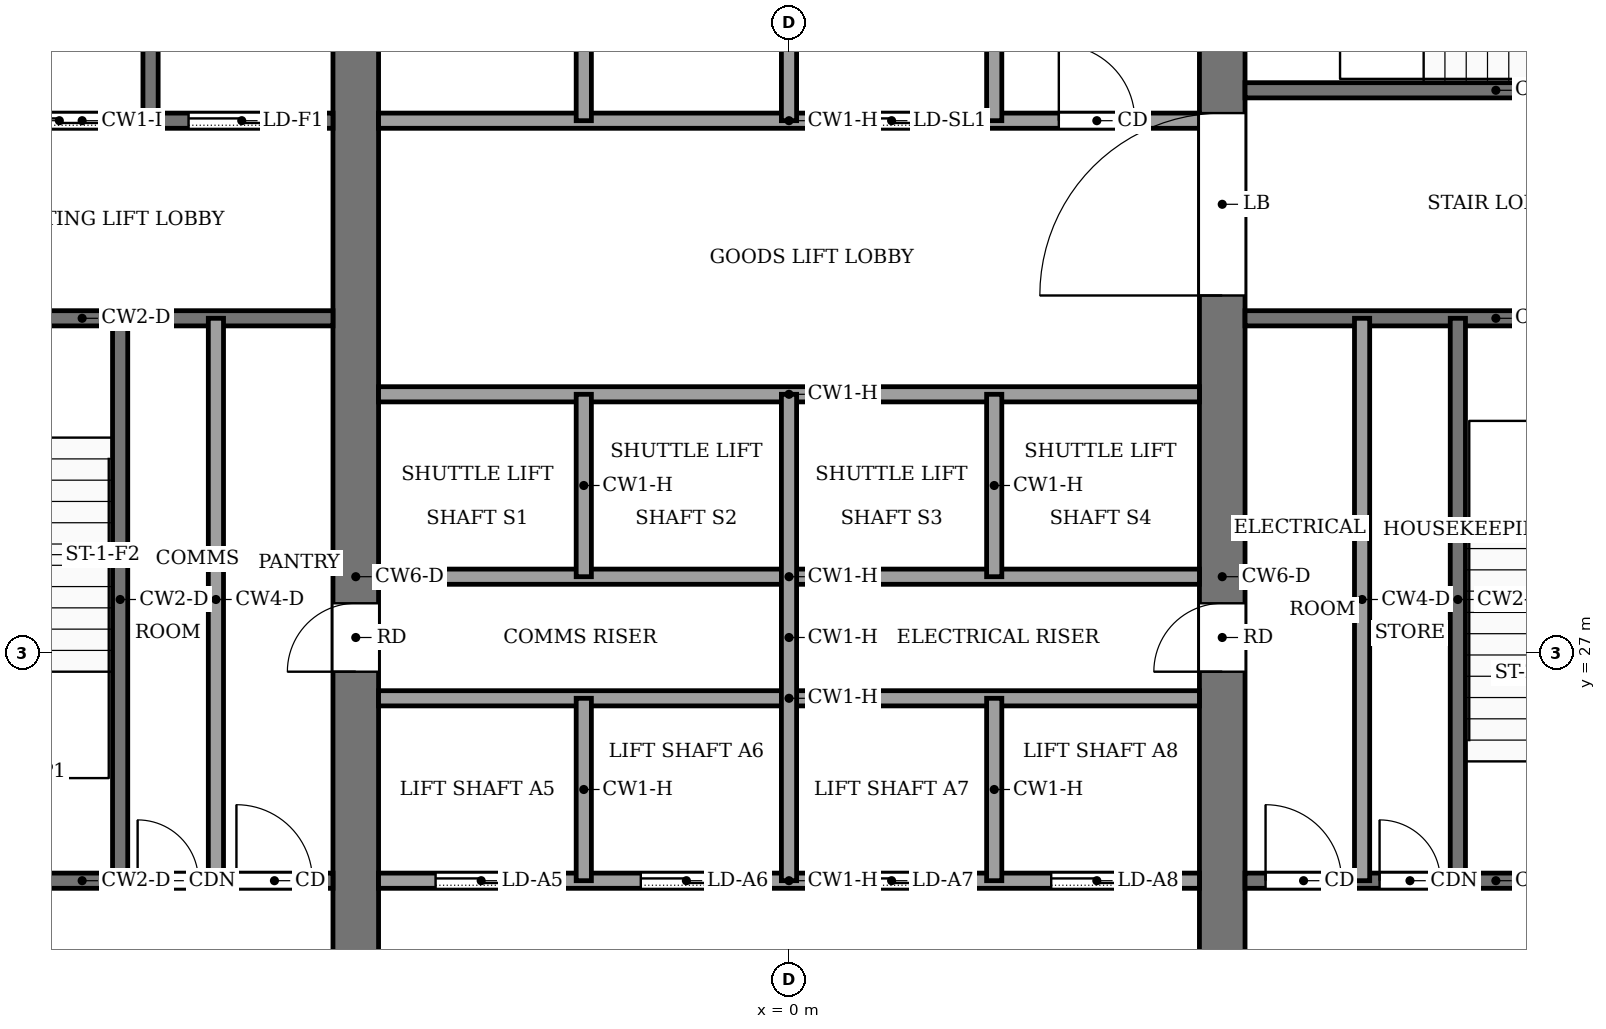
"""IFC4 building model, lengths in metres.
Left out: names, types, materials, properties, quantities, classifications, styles, units other than length and angle.
Written with IfcOpenShell. Run it as: python <this file> out.ifc"""

import sys

from ifc_helpers import new_model, si_unit, direction, frame, frame_2d, origin, place, context, subcontext, project, spatial, rectangle, extrude, element, fill, save


model = new_model("IFC4")
c1 = context("Model", 3, precision=1e-05, world=origin(), true_north=direction((0.0, 1.0)))
c2 = subcontext(c1, "Body", "Model", "MODEL_VIEW")
j1 = project(units=[si_unit("LENGTHUNIT", "METRE"), si_unit("PLANEANGLEUNIT", "RADIAN")], contexts=[c1])
p1 = place(None, origin())
s1 = spatial("IfcSite", under=j1, at=p1, CompositionType="ELEMENT")
p2 = place(p1, origin())
s2 = spatial("IfcBuilding", under=s1, at=p2, CompositionType="ELEMENT")
p3 = place(p2, frame((0.0, 0.0, 54.0)))
s3 = spatial("IfcBuildingStorey", under=s2, at=p3, CompositionType="ELEMENT", Elevation=54.0)
p4 = place(p3, frame((-5.7, 18.4, -0.13), z_axis=(0.0, 0.0, 1.0), x_axis=(0.0, 1.0, 0.0)))
e1 = element("IfcWall", 1, at=p4, inside=s3, PredefinedType="SHEAR", context=c2, shape_type="SweptSolid", body=[
    extrude(rectangle(XDim=19.2, YDim=0.6, at=frame_2d((9.6, 0.0))), origin(), (0.0, 0.0, 1.0), 3.88),
])
p5 = place(p4, frame((8.35, 0.0, 0.13)))
e2 = element("IfcOpeningElement", 2, at=p5, cuts=e1, PredefinedType="OPENING", context=c2, shape_type="SweptSolid", body=[
    extrude(rectangle(XDim=0.9, YDim=2.1, at=frame_2d((0.45, 1.05))), frame((0.0, 0.31, 0.0), z_axis=(0.0, -1.0, 0.0), x_axis=(1.0, 0.0, 0.0)), (0.0, 0.0, 1.0), 0.62),
])
p6 = place(p3, frame((5.7, 18.4, -0.13), z_axis=(0.0, 0.0, 1.0), x_axis=(0.0, 1.0, 0.0)))
e3 = element("IfcWall", 3, at=p6, inside=s3, PredefinedType="SHEAR", context=c2, shape_type="SweptSolid", body=[
    extrude(rectangle(XDim=19.2, YDim=0.6, at=frame_2d((9.6, 0.0))), origin(), (0.0, 0.0, 1.0), 3.88),
])
p7 = place(p6, frame((8.35, 0.0, 0.13)))
e4 = element("IfcOpeningElement", 4, at=p7, cuts=e3, PredefinedType="OPENING", context=c2, shape_type="SweptSolid", body=[
    extrude(rectangle(XDim=0.9, YDim=2.1, at=frame_2d((0.45, 1.05))), frame((0.0, 0.31, 0.0), z_axis=(0.0, -1.0, 0.0), x_axis=(1.0, 0.0, 0.0)), (0.0, 0.0, 1.0), 0.62),
])
p8 = place(p6, frame((13.3, 0.0, 0.13)))
e5 = element("IfcOpeningElement", 5, at=p8, cuts=e3, PredefinedType="OPENING", context=c2, shape_type="SweptSolid", body=[
    extrude(rectangle(XDim=2.4, YDim=2.4, at=frame_2d((1.2, 1.2))), frame((0.0, 0.31, 0.0), z_axis=(0.0, -1.0, 0.0), x_axis=(1.0, 0.0, 0.0)), (0.0, 0.0, 1.0), 0.62),
])
p9 = place(p3, frame((-12.6, 24.0, 0.0), z_axis=(0.0, 0.0, 1.0), x_axis=(1.0, 0.0, 0.0)))
e6 = element("IfcWall", 6, at=p9, inside=s3, PredefinedType="PARTITIONING", context=c2, shape_type="SweptSolid", body=[
    extrude(rectangle(XDim=6.6, YDim=0.2, at=frame_2d((3.3, 0.0))), origin(), (0.0, 0.0, 1.0), 3.75),
])
p10 = place(p9, frame((4.03, 0.0, 0.0)))
e7 = element("IfcOpeningElement", 7, at=p10, cuts=e6, PredefinedType="OPENING", context=c2, shape_type="SweptSolid", body=[
    extrude(rectangle(XDim=0.8, YDim=2.1, at=frame_2d((0.4, 1.05))), frame((0.0, 0.11, 0.0), z_axis=(0.0, -1.0, 0.0), x_axis=(1.0, 0.0, 0.0)), (0.0, 0.0, 1.0), 0.22),
])
p11 = place(p9, frame((5.33, 0.0, 0.0)))
e8 = element("IfcOpeningElement", 8, at=p11, cuts=e6, PredefinedType="OPENING", context=c2, shape_type="SweptSolid", body=[
    extrude(rectangle(XDim=1.0, YDim=2.1, at=frame_2d((0.5, 1.05))), frame((0.0, 0.11, 0.0), z_axis=(0.0, -1.0, 0.0), x_axis=(1.0, 0.0, 0.0)), (0.0, 0.0, 1.0), 0.22),
])
p12 = place(p3, frame((-5.4, 24.0, 0.0), z_axis=(0.0, 0.0, 1.0), x_axis=(1.0, 0.0, 0.0)))
e9 = element("IfcWall", 9, at=p12, inside=s3, PredefinedType="PARTITIONING", context=c2, shape_type="SweptSolid", body=[
    extrude(rectangle(XDim=10.8, YDim=0.2, at=frame_2d((5.4, 0.0))), origin(), (0.0, 0.0, 1.0), 3.75),
])
p13 = place(p12, frame((0.75, 0.0, 0.0)))
e10 = element("IfcOpeningElement", 10, at=p13, cuts=e9, PredefinedType="OPENING", context=c2, shape_type="SweptSolid", body=[
    extrude(rectangle(XDim=1.2, YDim=2.2, at=frame_2d((0.6, 1.1))), frame((0.0, 0.11, 0.0), z_axis=(0.0, -1.0, 0.0), x_axis=(1.0, 0.0, 0.0)), (0.0, 0.0, 1.0), 0.22),
])
p14 = place(p12, frame((3.45, 0.0, 0.0)))
e11 = element("IfcOpeningElement", 11, at=p14, cuts=e9, PredefinedType="OPENING", context=c2, shape_type="SweptSolid", body=[
    extrude(rectangle(XDim=1.2, YDim=2.2, at=frame_2d((0.6, 1.1))), frame((0.0, 0.11, 0.0), z_axis=(0.0, -1.0, 0.0), x_axis=(1.0, 0.0, 0.0)), (0.0, 0.0, 1.0), 0.22),
])
p15 = place(p12, frame((6.15, 0.0, 0.0)))
e12 = element("IfcOpeningElement", 12, at=p15, cuts=e9, PredefinedType="OPENING", context=c2, shape_type="SweptSolid", body=[
    extrude(rectangle(XDim=1.2, YDim=2.2, at=frame_2d((0.6, 1.1))), frame((0.0, 0.11, 0.0), z_axis=(0.0, -1.0, 0.0), x_axis=(1.0, 0.0, 0.0)), (0.0, 0.0, 1.0), 0.22),
])
p16 = place(p12, frame((8.85, 0.0, 0.0)))
e13 = element("IfcOpeningElement", 13, at=p16, cuts=e9, PredefinedType="OPENING", context=c2, shape_type="SweptSolid", body=[
    extrude(rectangle(XDim=1.2, YDim=2.2, at=frame_2d((0.6, 1.1))), frame((0.0, 0.11, 0.0), z_axis=(0.0, -1.0, 0.0), x_axis=(1.0, 0.0, 0.0)), (0.0, 0.0, 1.0), 0.22),
])
p17 = place(p3, frame((6.0, 24.0, 0.0), z_axis=(0.0, 0.0, 1.0), x_axis=(1.0, 0.0, 0.0)))
e14 = element("IfcWall", 14, at=p17, inside=s3, PredefinedType="PARTITIONING", context=c2, shape_type="SweptSolid", body=[
    extrude(rectangle(XDim=6.6, YDim=0.2, at=frame_2d((3.3, 0.0))), origin(), (0.0, 0.0, 1.0), 3.75),
])
p18 = place(p17, frame((0.27, 0.0, 0.0)))
e15 = element("IfcOpeningElement", 15, at=p18, cuts=e14, PredefinedType="OPENING", context=c2, shape_type="SweptSolid", body=[
    extrude(rectangle(XDim=1.0, YDim=2.1, at=frame_2d((0.5, 1.05))), frame((0.0, 0.11, 0.0), z_axis=(0.0, -1.0, 0.0), x_axis=(1.0, 0.0, 0.0)), (0.0, 0.0, 1.0), 0.22),
])
p19 = place(p17, frame((1.77, 0.0, 0.0)))
e16 = element("IfcOpeningElement", 16, at=p19, cuts=e14, PredefinedType="OPENING", context=c2, shape_type="SweptSolid", body=[
    extrude(rectangle(XDim=0.8, YDim=2.1, at=frame_2d((0.4, 1.05))), frame((0.0, 0.11, 0.0), z_axis=(0.0, -1.0, 0.0), x_axis=(1.0, 0.0, 0.0)), (0.0, 0.0, 1.0), 0.22),
])
p20 = place(p17, frame((4.4, 0.0, 0.0)))
e17 = element("IfcOpeningElement", 17, at=p20, cuts=e14, PredefinedType="OPENING", context=c2, shape_type="SweptSolid", body=[
    extrude(rectangle(XDim=1.2, YDim=2.2, at=frame_2d((0.6, 1.1))), frame((0.0, 0.11, 0.0), z_axis=(0.0, -1.0, 0.0), x_axis=(1.0, 0.0, 0.0)), (0.0, 0.0, 1.0), 0.22),
])
for number, where, z_axis, x_axis in (
    (18, (-5.4, 26.4, 0.0), (0.0, 0.0, 1.0), (1.0, 0.0, 0.0)),
    (19, (-5.4, 28.0, 0.0), (0.0, 0.0, 1.0), (1.0, 0.0, 0.0)),
    (20, (-5.4, 30.4, 0.0), (0.0, 0.0, 1.0), (1.0, 0.0, 0.0)),
):
    element("IfcWall", number, at=place(p3, frame(where, z_axis=z_axis, x_axis=x_axis)), inside=s3, PredefinedType="PARTITIONING", context=c2, shape_type="SweptSolid", body=[
        extrude(rectangle(XDim=10.8, YDim=0.2, at=frame_2d((5.4, 0.0))), origin(), (0.0, 0.0, 1.0), 3.75),
    ])
p21 = place(p3, frame((-12.6, 31.4, 0.0), z_axis=(0.0, 0.0, 1.0), x_axis=(1.0, 0.0, 0.0)))
e21 = element("IfcWall", 21, at=p21, inside=s3, PredefinedType="PARTITIONING", context=c2, shape_type="SweptSolid", body=[
    extrude(rectangle(XDim=6.6, YDim=0.2, at=frame_2d((3.3, 0.0))), origin(), (0.0, 0.0, 1.0), 3.75),
])
p22 = place(p21, frame((1.0, 0.0, 0.0)))
e22 = element("IfcOpeningElement", 22, at=p22, cuts=e21, PredefinedType="OPENING", context=c2, shape_type="SweptSolid", body=[
    extrude(rectangle(XDim=1.2, YDim=2.2, at=frame_2d((0.6, 1.1))), frame((0.0, 0.11, 0.0), z_axis=(0.0, -1.0, 0.0), x_axis=(1.0, 0.0, 0.0)), (0.0, 0.0, 1.0), 0.22),
])
p23 = place(p3, frame((6.0, 31.4, 0.0), z_axis=(0.0, 0.0, 1.0), x_axis=(1.0, 0.0, 0.0)))
e23 = element("IfcWall", 23, at=p23, inside=s3, PredefinedType="PARTITIONING", context=c2, shape_type="SweptSolid", body=[
    extrude(rectangle(XDim=6.6, YDim=0.2, at=frame_2d((3.3, 0.0))), origin(), (0.0, 0.0, 1.0), 3.75),
])
p24 = place(p3, frame((-12.6, 34.0, 0.0), z_axis=(0.0, 0.0, 1.0), x_axis=(1.0, 0.0, 0.0)))
e24 = element("IfcWall", 24, at=p24, inside=s3, PredefinedType="PARTITIONING", context=c2, shape_type="SweptSolid", body=[
    extrude(rectangle(XDim=6.6, YDim=0.2, at=frame_2d((3.3, 0.0))), origin(), (0.0, 0.0, 1.0), 3.75),
])
p25 = place(p24, frame((4.7, 0.0, 0.0)))
e25 = element("IfcOpeningElement", 25, at=p25, cuts=e24, PredefinedType="OPENING", context=c2, shape_type="SweptSolid", body=[
    extrude(rectangle(XDim=1.4, YDim=2.2, at=frame_2d((0.7, 1.1))), frame((0.0, 0.11, 0.0), z_axis=(0.0, -1.0, 0.0), x_axis=(1.0, 0.0, 0.0)), (0.0, 0.0, 1.0), 0.22),
])
p26 = place(p24, frame((2.3, 0.0, 0.0)))
e26 = element("IfcOpeningElement", 26, at=p26, cuts=e24, PredefinedType="OPENING", context=c2, shape_type="SweptSolid", body=[
    extrude(rectangle(XDim=1.4, YDim=2.2, at=frame_2d((0.7, 1.1))), frame((0.0, 0.11, 0.0), z_axis=(0.0, -1.0, 0.0), x_axis=(1.0, 0.0, 0.0)), (0.0, 0.0, 1.0), 0.22),
])
p27 = place(p24, frame((0.45, 0.0, 0.0)))
e27 = element("IfcOpeningElement", 27, at=p27, cuts=e24, PredefinedType="OPENING", context=c2, shape_type="SweptSolid", body=[
    extrude(rectangle(XDim=0.9, YDim=2.1, at=frame_2d((0.45, 1.05))), frame((0.0, 0.11, 0.0), z_axis=(0.0, -1.0, 0.0), x_axis=(1.0, 0.0, 0.0)), (0.0, 0.0, 1.0), 0.22),
])
p28 = place(p3, frame((-5.4, 34.0, 0.0), z_axis=(0.0, 0.0, 1.0), x_axis=(1.0, 0.0, 0.0)))
e28 = element("IfcWall", 28, at=p28, inside=s3, PredefinedType="PARTITIONING", context=c2, shape_type="SweptSolid", body=[
    extrude(rectangle(XDim=10.8, YDim=0.2, at=frame_2d((5.4, 0.0))), origin(), (0.0, 0.0, 1.0), 3.75),
])
p29 = place(p28, frame((6.15, 0.0, 0.0)))
e29 = element("IfcOpeningElement", 29, at=p29, cuts=e28, PredefinedType="OPENING", context=c2, shape_type="SweptSolid", body=[
    extrude(rectangle(XDim=1.2, YDim=2.2, at=frame_2d((0.6, 1.1))), frame((0.0, 0.11, 0.0), z_axis=(0.0, -1.0, 0.0), x_axis=(1.0, 0.0, 0.0)), (0.0, 0.0, 1.0), 0.22),
])
p30 = place(p28, frame((8.95, 0.0, 0.0)))
e30 = element("IfcOpeningElement", 30, at=p30, cuts=e28, PredefinedType="OPENING", context=c2, shape_type="SweptSolid", body=[
    extrude(rectangle(XDim=1.0, YDim=2.1, at=frame_2d((0.5, 1.05))), frame((0.0, 0.11, 0.0), z_axis=(0.0, -1.0, 0.0), x_axis=(1.0, 0.0, 0.0)), (0.0, 0.0, 1.0), 0.22),
])
p31 = place(p3, frame((6.0, 34.4, 0.0), z_axis=(0.0, 0.0, 1.0), x_axis=(1.0, 0.0, 0.0)))
e31 = element("IfcWall", 31, at=p31, inside=s3, PredefinedType="PARTITIONING", context=c2, shape_type="SweptSolid", body=[
    extrude(rectangle(XDim=6.6, YDim=0.2, at=frame_2d((3.3, 0.0))), origin(), (0.0, 0.0, 1.0), 3.75),
])
p32 = place(p31, frame((4.8, 0.0, 0.0)))
e32 = element("IfcOpeningElement", 32, at=p32, cuts=e31, PredefinedType="OPENING", context=c2, shape_type="SweptSolid", body=[
    extrude(rectangle(XDim=1.2, YDim=2.2, at=frame_2d((0.6, 1.1))), frame((0.0, 0.11, 0.0), z_axis=(0.0, -1.0, 0.0), x_axis=(1.0, 0.0, 0.0)), (0.0, 0.0, 1.0), 0.22),
])
p33 = place(p3, frame((-8.8, 24.0, 0.0), z_axis=(0.0, 0.0, 1.0), x_axis=(0.0, 1.0, 0.0)))
e33 = element("IfcWall", 33, at=p33, inside=s3, PredefinedType="PARTITIONING", context=c2, shape_type="SweptSolid", body=[
    extrude(rectangle(XDim=7.4, YDim=0.2, at=frame_2d((3.7, 0.0))), origin(), (0.0, 0.0, 1.0), 3.75),
])
p34 = place(p3, frame((-8.4, 34.0, 0.0), z_axis=(0.0, 0.0, 1.0), x_axis=(0.0, 1.0, 0.0)))
e34 = element("IfcWall", 34, at=p34, inside=s3, PredefinedType="PARTITIONING", context=c2, shape_type="SweptSolid", body=[
    extrude(rectangle(XDim=3.6, YDim=0.2, at=frame_2d((1.8, 0.0))), origin(), (0.0, 0.0, 1.0), 3.75),
])
p35 = place(p3, frame((-7.54, 24.0, 0.0), z_axis=(0.0, 0.0, 1.0), x_axis=(0.0, 1.0, 0.0)))
e35 = element("IfcWall", 35, at=p35, inside=s3, PredefinedType="PARTITIONING", context=c2, shape_type="SweptSolid", body=[
    extrude(rectangle(XDim=7.4, YDim=0.2, at=frame_2d((3.7, 0.0))), origin(), (0.0, 0.0, 1.0), 3.75),
])
for number, where, z_axis, x_axis in (
    (36, (-2.7, 24.0, 0.0), (0.0, 0.0, 1.0), (0.0, 1.0, 0.0)),
    (37, (-2.7, 28.0, 0.0), (0.0, 0.0, 1.0), (0.0, 1.0, 0.0)),
):
    element("IfcWall", number, at=place(p3, frame(where, z_axis=z_axis, x_axis=x_axis)), inside=s3, PredefinedType="PARTITIONING", context=c2, shape_type="SweptSolid", body=[
        extrude(rectangle(XDim=2.4, YDim=0.2, at=frame_2d((1.2, 0.0))), origin(), (0.0, 0.0, 1.0), 3.75),
    ])
p36 = place(p3, frame((-2.7, 34.0, 0.0), z_axis=(0.0, 0.0, 1.0), x_axis=(0.0, 1.0, 0.0)))
e38 = element("IfcWall", 38, at=p36, inside=s3, PredefinedType="PARTITIONING", context=c2, shape_type="SweptSolid", body=[
    extrude(rectangle(XDim=3.6, YDim=0.2, at=frame_2d((1.8, 0.0))), origin(), (0.0, 0.0, 1.0), 3.75),
])
p37 = place(p3, frame((0.0, 24.0, 0.0), z_axis=(0.0, 0.0, 1.0), x_axis=(0.0, 1.0, 0.0)))
e39 = element("IfcWall", 39, at=p37, inside=s3, PredefinedType="PARTITIONING", context=c2, shape_type="SweptSolid", body=[
    extrude(rectangle(XDim=6.4, YDim=0.2, at=frame_2d((3.2, 0.0))), origin(), (0.0, 0.0, 1.0), 3.75),
])
p38 = place(p3, frame((0.0, 34.0, 0.0), z_axis=(0.0, 0.0, 1.0), x_axis=(0.0, 1.0, 0.0)))
e40 = element("IfcWall", 40, at=p38, inside=s3, PredefinedType="PARTITIONING", context=c2, shape_type="SweptSolid", body=[
    extrude(rectangle(XDim=3.6, YDim=0.2, at=frame_2d((1.8, 0.0))), origin(), (0.0, 0.0, 1.0), 3.75),
])
for number, where, z_axis, x_axis in (
    (41, (2.7, 24.0, 0.0), (0.0, 0.0, 1.0), (0.0, 1.0, 0.0)),
    (42, (2.7, 28.0, 0.0), (0.0, 0.0, 1.0), (0.0, 1.0, 0.0)),
):
    element("IfcWall", number, at=place(p3, frame(where, z_axis=z_axis, x_axis=x_axis)), inside=s3, PredefinedType="PARTITIONING", context=c2, shape_type="SweptSolid", body=[
        extrude(rectangle(XDim=2.4, YDim=0.2, at=frame_2d((1.2, 0.0))), origin(), (0.0, 0.0, 1.0), 3.75),
    ])
p39 = place(p3, frame((2.7, 34.0, 0.0), z_axis=(0.0, 0.0, 1.0), x_axis=(0.0, 1.0, 0.0)))
e43 = element("IfcWall", 43, at=p39, inside=s3, PredefinedType="PARTITIONING", context=c2, shape_type="SweptSolid", body=[
    extrude(rectangle(XDim=3.6, YDim=0.2, at=frame_2d((1.8, 0.0))), origin(), (0.0, 0.0, 1.0), 3.75),
])
for number, where, z_axis, x_axis in (
    (44, (7.54, 24.0, 0.0), (0.0, 0.0, 1.0), (0.0, 1.0, 0.0)),
    (45, (8.8, 24.0, 0.0), (0.0, 0.0, 1.0), (0.0, 1.0, 0.0)),
):
    element("IfcWall", number, at=place(p3, frame(where, z_axis=z_axis, x_axis=x_axis)), inside=s3, PredefinedType="PARTITIONING", context=c2, shape_type="SweptSolid", body=[
        extrude(rectangle(XDim=7.4, YDim=0.2, at=frame_2d((3.7, 0.0))), origin(), (0.0, 0.0, 1.0), 3.75),
    ])
p40 = place(p13, origin())
e46 = element("IfcDoor", 46, at=p40, inside=s3, OperationType="SLIDING_TO_LEFT", PredefinedType="DOOR", context=c2, shape_type="SweptSolid", body=[
    extrude(rectangle(XDim=1.2, YDim=2.2, at=frame_2d((0.6, 1.1))), frame((0.0, 0.025, 0.0), z_axis=(0.0, -1.0, 0.0), x_axis=(1.0, 0.0, 0.0)), (0.0, 0.0, 1.0), 0.05),
])
fill(e10, e46)
p41 = place(p14, origin())
e47 = element("IfcDoor", 47, at=p41, inside=s3, OperationType="SLIDING_TO_LEFT", PredefinedType="DOOR", context=c2, shape_type="SweptSolid", body=[
    extrude(rectangle(XDim=1.2, YDim=2.2, at=frame_2d((0.6, 1.1))), frame((0.0, 0.025, 0.0), z_axis=(0.0, -1.0, 0.0), x_axis=(1.0, 0.0, 0.0)), (0.0, 0.0, 1.0), 0.05),
])
fill(e11, e47)
p42 = place(p15, origin())
e48 = element("IfcDoor", 48, at=p42, inside=s3, OperationType="SLIDING_TO_LEFT", PredefinedType="DOOR", context=c2, shape_type="SweptSolid", body=[
    extrude(rectangle(XDim=1.2, YDim=2.2, at=frame_2d((0.6, 1.1))), frame((0.0, 0.025, 0.0), z_axis=(0.0, -1.0, 0.0), x_axis=(1.0, 0.0, 0.0)), (0.0, 0.0, 1.0), 0.05),
])
fill(e12, e48)
p43 = place(p16, origin())
e49 = element("IfcDoor", 49, at=p43, inside=s3, OperationType="SLIDING_TO_LEFT", PredefinedType="DOOR", context=c2, shape_type="SweptSolid", body=[
    extrude(rectangle(XDim=1.2, YDim=2.2, at=frame_2d((0.6, 1.1))), frame((0.0, 0.025, 0.0), z_axis=(0.0, -1.0, 0.0), x_axis=(1.0, 0.0, 0.0)), (0.0, 0.0, 1.0), 0.05),
])
fill(e13, e49)
p44 = place(p29, origin())
e50 = element("IfcDoor", 50, at=p44, inside=s3, OperationType="SLIDING_TO_LEFT", PredefinedType="DOOR", context=c2, shape_type="SweptSolid", body=[
    extrude(rectangle(XDim=1.2, YDim=2.2, at=frame_2d((0.6, 1.1))), frame((0.0, 0.025, 0.0), z_axis=(0.0, -1.0, 0.0), x_axis=(1.0, 0.0, 0.0)), (0.0, 0.0, 1.0), 0.05),
])
fill(e29, e50)
p45 = place(p25, origin())
e51 = element("IfcDoor", 51, at=p45, inside=s3, OperationType="SLIDING_TO_LEFT", PredefinedType="DOOR", context=c2, shape_type="SweptSolid", body=[
    extrude(rectangle(XDim=1.4, YDim=2.2, at=frame_2d((0.7, 1.1))), frame((0.0, 0.025, 0.0), z_axis=(0.0, -1.0, 0.0), x_axis=(1.0, 0.0, 0.0)), (0.0, 0.0, 1.0), 0.05),
])
fill(e25, e51)
p46 = place(p26, origin())
e52 = element("IfcDoor", 52, at=p46, inside=s3, OperationType="SLIDING_TO_LEFT", PredefinedType="DOOR", context=c2, shape_type="SweptSolid", body=[
    extrude(rectangle(XDim=1.4, YDim=2.2, at=frame_2d((0.7, 1.1))), frame((0.0, 0.025, 0.0), z_axis=(0.0, -1.0, 0.0), x_axis=(1.0, 0.0, 0.0)), (0.0, 0.0, 1.0), 0.05),
])
fill(e26, e52)
p47 = place(p10, origin())
e53 = element("IfcDoor", 53, at=p47, inside=s3, OperationType="SINGLE_SWING_RIGHT", PredefinedType="DOOR", context=c2, shape_type="SweptSolid", body=[
    extrude(rectangle(XDim=0.8, YDim=2.1, at=frame_2d((0.4, 1.05))), frame((0.0, 0.025, 0.0), z_axis=(0.0, -1.0, 0.0), x_axis=(1.0, 0.0, 0.0)), (0.0, 0.0, 1.0), 0.05),
])
fill(e7, e53)
p48 = place(p11, origin())
e54 = element("IfcDoor", 54, at=p48, inside=s3, OperationType="SINGLE_SWING_LEFT", PredefinedType="DOOR", context=c2, shape_type="SweptSolid", body=[
    extrude(rectangle(XDim=1.0, YDim=2.1, at=frame_2d((0.5, 1.05))), frame((0.0, 0.025, 0.0), z_axis=(0.0, -1.0, 0.0), x_axis=(1.0, 0.0, 0.0)), (0.0, 0.0, 1.0), 0.05),
])
fill(e8, e54)
p49 = place(p18, origin())
e55 = element("IfcDoor", 55, at=p49, inside=s3, OperationType="SINGLE_SWING_RIGHT", PredefinedType="DOOR", context=c2, shape_type="SweptSolid", body=[
    extrude(rectangle(XDim=1.0, YDim=2.1, at=frame_2d((0.5, 1.05))), frame((0.0, 0.025, 0.0), z_axis=(0.0, -1.0, 0.0), x_axis=(1.0, 0.0, 0.0)), (0.0, 0.0, 1.0), 0.05),
])
fill(e15, e55)
p50 = place(p19, origin())
e56 = element("IfcDoor", 56, at=p50, inside=s3, OperationType="SINGLE_SWING_LEFT", PredefinedType="DOOR", context=c2, shape_type="SweptSolid", body=[
    extrude(rectangle(XDim=0.8, YDim=2.1, at=frame_2d((0.4, 1.05))), frame((0.0, 0.025, 0.0), z_axis=(0.0, -1.0, 0.0), x_axis=(1.0, 0.0, 0.0)), (0.0, 0.0, 1.0), 0.05),
])
fill(e16, e56)
p51 = place(p30, origin())
e57 = element("IfcDoor", 57, at=p51, inside=s3, OperationType="SINGLE_SWING_LEFT", PredefinedType="DOOR", context=c2, shape_type="SweptSolid", body=[
    extrude(rectangle(XDim=1.0, YDim=2.1, at=frame_2d((0.5, 1.05))), frame((0.0, 0.025, 0.0), z_axis=(0.0, -1.0, 0.0), x_axis=(1.0, 0.0, 0.0)), (0.0, 0.0, 1.0), 0.05),
])
fill(e30, e57)
p52 = place(p5, origin())
e58 = element("IfcDoor", 58, at=p52, inside=s3, OperationType="SINGLE_SWING_RIGHT", PredefinedType="DOOR", context=c2, shape_type="SweptSolid", body=[
    extrude(rectangle(XDim=0.9, YDim=2.1, at=frame_2d((0.45, 1.05))), frame((0.0, 0.025, 0.0), z_axis=(0.0, -1.0, 0.0), x_axis=(1.0, 0.0, 0.0)), (0.0, 0.0, 1.0), 0.05),
])
fill(e2, e58)
p53 = place(p7, origin())
e59 = element("IfcDoor", 59, at=p53, inside=s3, OperationType="SINGLE_SWING_LEFT", PredefinedType="DOOR", context=c2, shape_type="SweptSolid", body=[
    extrude(rectangle(XDim=0.9, YDim=2.1, at=frame_2d((0.45, 1.05))), frame((0.0, 0.025, 0.0), z_axis=(0.0, -1.0, 0.0), x_axis=(1.0, 0.0, 0.0)), (0.0, 0.0, 1.0), 0.05),
])
fill(e4, e59)
p54 = place(p8, origin())
e60 = element("IfcDoor", 60, at=p54, inside=s3, OperationType="DOUBLE_DOOR_SINGLE_SWING", PredefinedType="DOOR", context=c2, shape_type="SweptSolid", body=[
    extrude(rectangle(XDim=2.4, YDim=2.4, at=frame_2d((1.2, 1.2))), frame((0.0, 0.025, 0.0), z_axis=(0.0, -1.0, 0.0), x_axis=(1.0, 0.0, 0.0)), (0.0, 0.0, 1.0), 0.05),
])
fill(e5, e60)
save(model, sys.argv[1])
